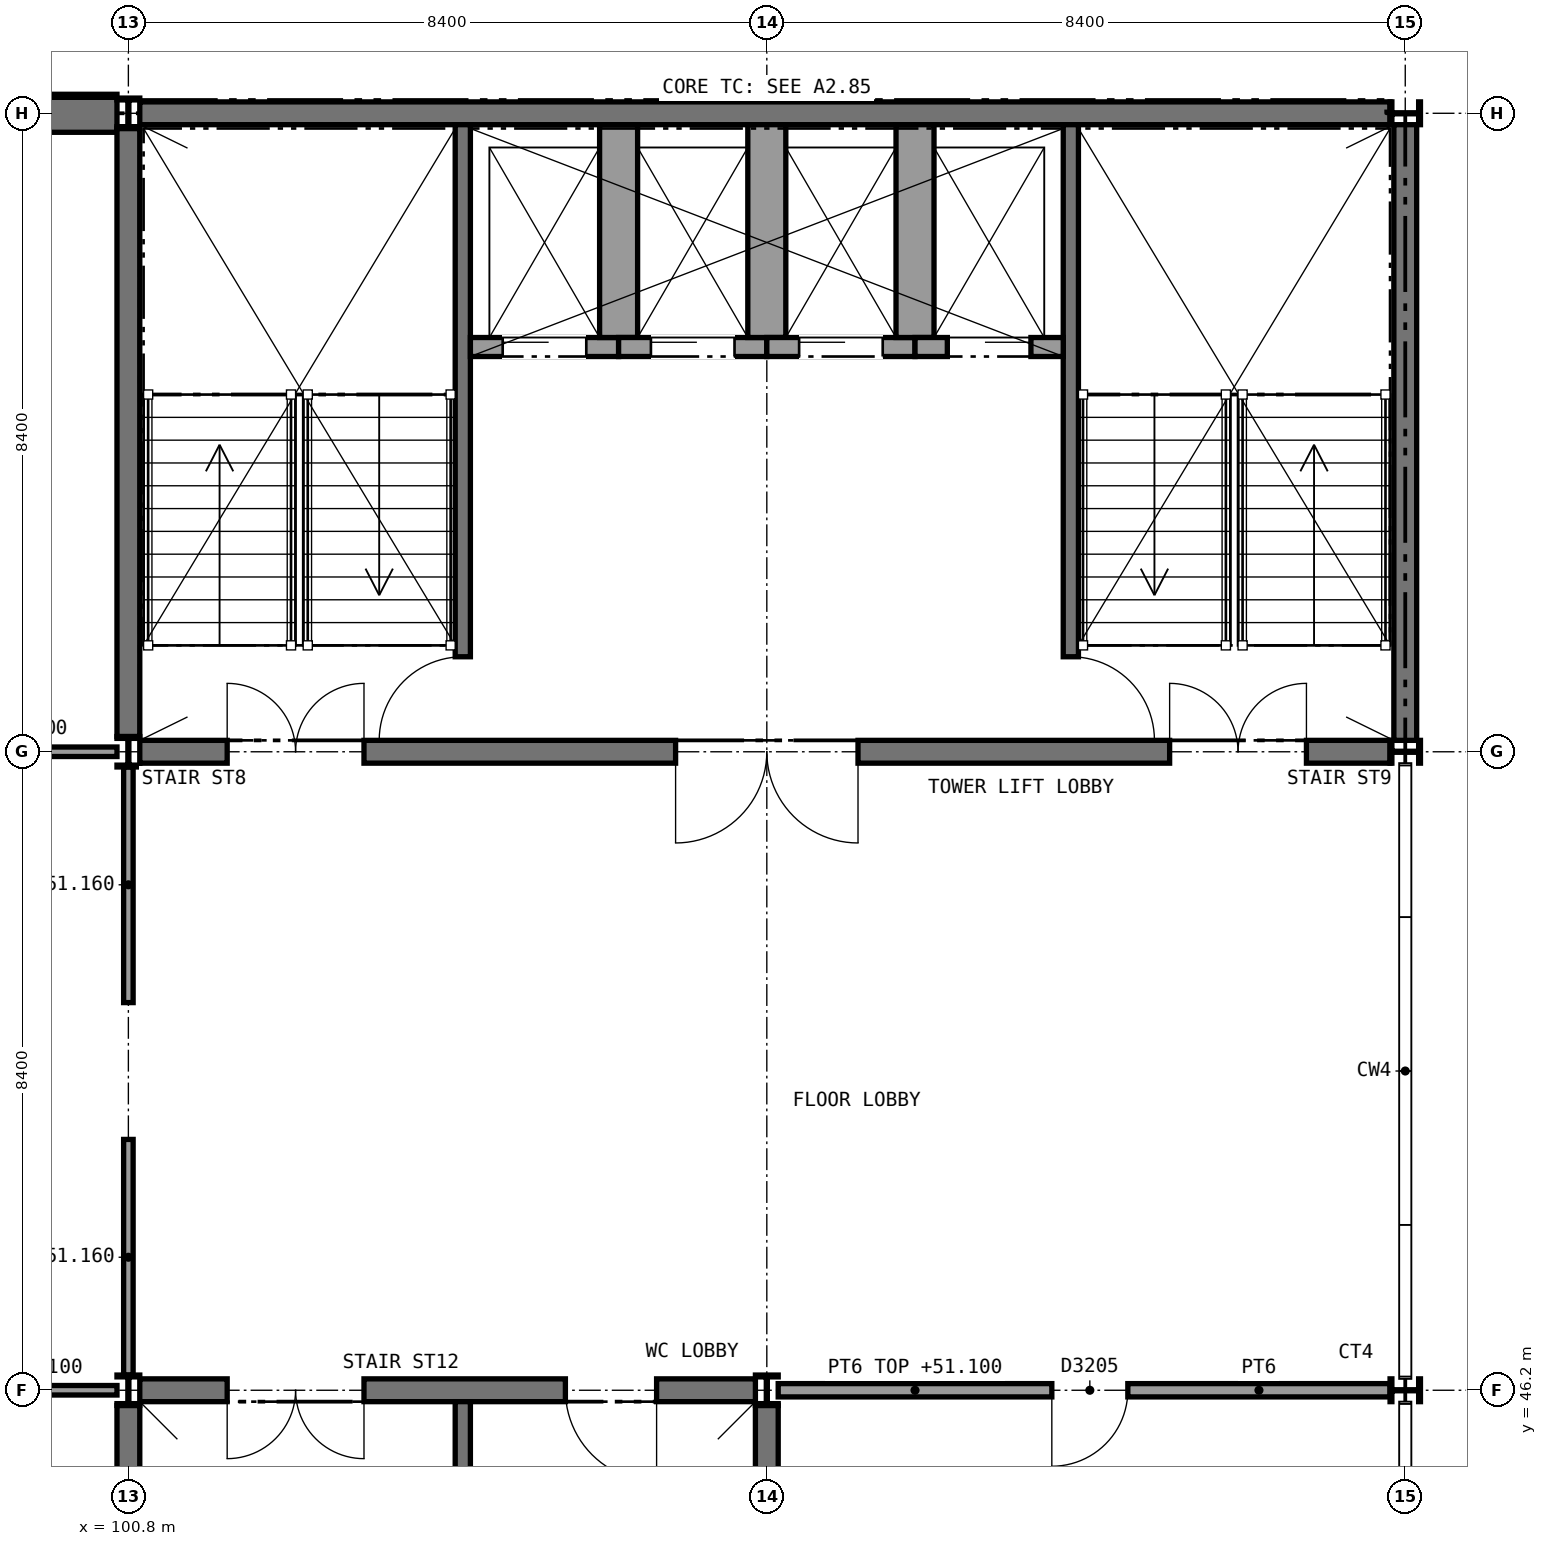
"""IFC4 building model, lengths in metres.
Left out: names, types, materials, properties, quantities, classifications, styles, units other than length and angle.
Written with IfcOpenShell. Run it as: python <this file> out.ifc"""

import sys

from ifc_helpers import new_model, si_unit, direction, frame, frame_2d, origin, origin_2d, place, context, subcontext, project, spatial, rectangle, i_section, extrude, element, fill, save


model = new_model("IFC4")
c1 = context("Model", 3, precision=1e-05, world=origin(), true_north=direction((0.0, 1.0)))
c2 = subcontext(c1, "Body", "Model", "MODEL_VIEW")
j1 = project(units=[si_unit("LENGTHUNIT", "METRE"), si_unit("PLANEANGLEUNIT", "RADIAN")], contexts=[c1])
p1 = place(None, origin())
s1 = spatial("IfcSite", under=j1, at=p1, CompositionType="ELEMENT")
p2 = place(p1, origin())
s2 = spatial("IfcBuilding", under=s1, at=p2, CompositionType="ELEMENT")
p3 = place(p2, frame((0.0, 0.0, 47.6)))
s3 = spatial("IfcBuildingStorey", under=s2, at=p3, CompositionType="ELEMENT", Elevation=47.6)
p4 = place(p3, frame((92.475, 63.0, 0.0), z_axis=(0.0, 0.0, 1.0), x_axis=(1.0, 0.0, 0.0)))
e1 = element("IfcWall", 1, at=p4, inside=s3, PredefinedType="SHEAR", context=c2, shape_type="SweptSolid", body=[
    extrude(rectangle(XDim=8.175, YDim=0.5, at=frame_2d((4.088, 0.0))), origin(), (0.0, 0.0, 1.0), 3.85),
])
p5 = place(p3, frame((100.95, 63.0, 0.0), z_axis=(0.0, 0.0, 1.0), x_axis=(1.0, 0.0, 0.0)))
e2 = element("IfcWall", 2, at=p5, inside=s3, PredefinedType="SHEAR", context=c2, shape_type="SweptSolid", body=[
    extrude(rectangle(XDim=16.45, YDim=0.3, at=frame_2d((8.225, 0.0))), origin(), (0.0, 0.0, 1.0), 3.85),
])
p6 = place(p3, frame((100.95, 54.6, 0.0), z_axis=(0.0, 0.0, 1.0), x_axis=(1.0, 0.0, 0.0)))
e3 = element("IfcWall", 3, at=p6, inside=s3, PredefinedType="SHEAR", context=c2, shape_type="SweptSolid", body=[
    extrude(rectangle(XDim=16.45, YDim=0.3, at=frame_2d((8.225, 0.0))), origin(), (0.0, 0.0, 1.0), 3.85),
])
p7 = place(p6, frame((1.15, 0.0, 0.0)))
e4 = element("IfcOpeningElement", 4, at=p7, cuts=e3, PredefinedType="OPENING", context=c2, shape_type="SweptSolid", body=[
    extrude(rectangle(XDim=1.8, YDim=2.1, at=frame_2d((0.9, 1.05))), frame((0.0, 0.16, 0.0), z_axis=(0.0, -1.0, 0.0), x_axis=(1.0, 0.0, 0.0)), (0.0, 0.0, 1.0), 0.32),
])
p8 = place(p6, frame((13.55, 0.0, 0.0)))
e5 = element("IfcOpeningElement", 5, at=p8, cuts=e3, PredefinedType="OPENING", context=c2, shape_type="SweptSolid", body=[
    extrude(rectangle(XDim=1.8, YDim=2.1, at=frame_2d((0.9, 1.05))), frame((0.0, 0.16, 0.0), z_axis=(0.0, -1.0, 0.0), x_axis=(1.0, 0.0, 0.0)), (0.0, 0.0, 1.0), 0.32),
])
p9 = place(p6, frame((7.05, 0.0, 0.0)))
e6 = element("IfcOpeningElement", 6, at=p9, cuts=e3, PredefinedType="OPENING", context=c2, shape_type="SweptSolid", body=[
    extrude(rectangle(XDim=2.4, YDim=2.4, at=frame_2d((1.2, 1.2))), frame((0.0, 0.16, 0.0), z_axis=(0.0, -1.0, 0.0), x_axis=(1.0, 0.0, 0.0)), (0.0, 0.0, 1.0), 0.32),
])
p10 = place(p3, frame((100.8, 54.8, 0.0), z_axis=(0.0, 0.0, 1.0), x_axis=(0.0, 1.0, 0.0)))
e7 = element("IfcWall", 7, at=p10, inside=s3, PredefinedType="SHEAR", context=c2, shape_type="SweptSolid", body=[
    extrude(rectangle(XDim=8.0, YDim=0.3, at=frame_2d((4.0, 0.0))), origin(), (0.0, 0.0, 1.0), 3.85),
])
p11 = place(p3, frame((117.6, 54.75, 0.0), z_axis=(0.0, 0.0, 1.0), x_axis=(0.0, 1.0, 0.0)))
e8 = element("IfcWall", 8, at=p11, inside=s3, PredefinedType="SHEAR", context=c2, shape_type="SweptSolid", body=[
    extrude(rectangle(XDim=8.1, YDim=0.3, at=frame_2d((4.05, 0.0))), origin(), (0.0, 0.0, 1.0), 3.85),
])
p12 = place(p3, frame((100.95, 46.2, 0.0), z_axis=(0.0, 0.0, 1.0), x_axis=(1.0, 0.0, 0.0)))
e9 = element("IfcWall", 9, at=p12, inside=s3, PredefinedType="SHEAR", context=c2, shape_type="SweptSolid", body=[
    extrude(rectangle(XDim=8.1, YDim=0.3, at=frame_2d((4.05, 0.0))), origin(), (0.0, 0.0, 1.0), 3.85),
])
p13 = place(p12, frame((1.15, 0.0, 0.0)))
e10 = element("IfcOpeningElement", 10, at=p13, cuts=e9, PredefinedType="OPENING", context=c2, shape_type="SweptSolid", body=[
    extrude(rectangle(XDim=1.8, YDim=2.1, at=frame_2d((0.9, 1.05))), frame((0.0, 0.16, 0.0), z_axis=(0.0, -1.0, 0.0), x_axis=(1.0, 0.0, 0.0)), (0.0, 0.0, 1.0), 0.32),
])
p14 = place(p12, frame((5.6, 0.0, 0.0)))
e11 = element("IfcOpeningElement", 11, at=p14, cuts=e9, PredefinedType="OPENING", context=c2, shape_type="SweptSolid", body=[
    extrude(rectangle(XDim=1.2, YDim=2.1, at=frame_2d((0.6, 1.05))), frame((0.0, 0.16, 0.0), z_axis=(0.0, -1.0, 0.0), x_axis=(1.0, 0.0, 0.0)), (0.0, 0.0, 1.0), 0.32),
])
for number, where, z_axis, x_axis in (
    (12, (100.8, 38.0, 0.0), (0.0, 0.0, 1.0), (0.0, 1.0, 0.0)),
    (13, (109.2, 38.0, 0.0), (0.0, 0.0, 1.0), (0.0, 1.0, 0.0)),
):
    element("IfcWall", number, at=place(p3, frame(where, z_axis=z_axis, x_axis=x_axis)), inside=s3, PredefinedType="SHEAR", context=c2, shape_type="SweptSolid", body=[
        extrude(rectangle(XDim=8.0, YDim=0.3, at=frame_2d((4.0, 0.0))), origin(), (0.0, 0.0, 1.0), 3.85),
    ])
for number, where, z_axis, x_axis in (
    (14, (100.8, 46.2, 0.0), (0.0, 0.0, 1.0), (1.0, 0.0, 0.0)),
    (15, (100.8, 54.6, 0.0), (0.0, 0.0, 1.0), (1.0, 0.0, 0.0)),
    (16, (100.8, 63.0, 0.0), (0.0, 0.0, 1.0), (1.0, 0.0, 0.0)),
    (17, (109.2, 46.2, 0.0), (0.0, 0.0, 1.0), (1.0, 0.0, 0.0)),
    (18, (117.6, 46.2, 0.0), (0.0, 0.0, 1.0), (0.0, 1.0, 0.0)),
    (19, (117.6, 54.6, 0.0), (0.0, 0.0, 1.0), (0.0, 1.0, 0.0)),
    (20, (117.6, 63.0, 0.0), (0.0, 0.0, 1.0), (0.0, 1.0, 0.0)),
):
    element("IfcColumn", number, at=place(p3, frame(where, z_axis=z_axis, x_axis=x_axis)), inside=s3, PredefinedType="COLUMN", context=c2, shape_type="SweptSolid", body=[
        extrude(i_section(OverallWidth=0.3, OverallDepth=0.4, WebThickness=0.013, FlangeThickness=0.024, FilletRadius=0.027, at=origin_2d()), origin(), (0.0, 0.0, 1.0), 4.0),
    ])
p15 = place(p3, frame((92.55, 46.2, 0.0), z_axis=(0.0, 0.0, 1.0), x_axis=(1.0, 0.0, 0.0)))
e21 = element("IfcWall", 21, at=p15, inside=s3, PredefinedType="PARTITIONING", context=c2, shape_type="SweptSolid", body=[
    extrude(rectangle(XDim=8.1, YDim=0.125, at=frame_2d((4.05, 0.0))), origin(), (0.0, 0.0, 1.0), 3.5),
])
p16 = place(p15, frame((3.1, 0.0, 0.0)))
e22 = element("IfcOpeningElement", 22, at=p16, cuts=e21, PredefinedType="OPENING", context=c2, shape_type="SweptSolid", body=[
    extrude(rectangle(XDim=1.8, YDim=2.1, at=frame_2d((0.9, 1.05))), frame((0.0, 0.073, 0.0), z_axis=(0.0, -1.0, 0.0), x_axis=(1.0, 0.0, 0.0)), (0.0, 0.0, 1.0), 0.145),
])
p17 = place(p3, frame((109.35, 46.2, 0.0), z_axis=(0.0, 0.0, 1.0), x_axis=(1.0, 0.0, 0.0)))
e23 = element("IfcWall", 23, at=p17, inside=s3, PredefinedType="PARTITIONING", context=c2, shape_type="SweptSolid", body=[
    extrude(rectangle(XDim=8.05, YDim=0.175, at=frame_2d((4.025, 0.0))), origin(), (0.0, 0.0, 1.0), 3.5),
])
p18 = place(p17, frame((3.6, 0.0, 0.0)))
e24 = element("IfcOpeningElement", 24, at=p18, cuts=e23, PredefinedType="OPENING", context=c2, shape_type="SweptSolid", body=[
    extrude(rectangle(XDim=1.0, YDim=2.1, at=frame_2d((0.5, 1.05))), frame((0.0, 0.098, 0.0), z_axis=(0.0, -1.0, 0.0), x_axis=(1.0, 0.0, 0.0)), (0.0, 0.0, 1.0), 0.195),
])
for number, where, z_axis, x_axis in (
    (25, (100.8, 46.4, 0.0), (0.0, 0.0, 1.0), (0.0, 1.0, 0.0)),
    (26, (100.8, 51.3, 0.0), (0.0, 0.0, 1.0), (0.0, 1.0, 0.0)),
):
    element("IfcWall", number, at=place(p3, frame(where, z_axis=z_axis, x_axis=x_axis)), inside=s3, PredefinedType="PARTITIONING", context=c2, shape_type="SweptSolid", body=[
        extrude(rectangle(XDim=3.1, YDim=0.125, at=frame_2d((1.55, 0.0))), origin(), (0.0, 0.0, 1.0), 3.56),
    ])
p19 = place(p3, frame((92.55, 54.6, 0.0), z_axis=(0.0, 0.0, 1.0), x_axis=(1.0, 0.0, 0.0)))
e27 = element("IfcWall", 27, at=p19, inside=s3, PredefinedType="PARTITIONING", context=c2, shape_type="SweptSolid", body=[
    extrude(rectangle(XDim=8.1, YDim=0.125, at=frame_2d((4.05, 0.0))), origin(), (0.0, 0.0, 1.0), 3.5),
])
p20 = place(p19, frame((3.6, 0.0, 0.0)))
e28 = element("IfcOpeningElement", 28, at=p20, cuts=e27, PredefinedType="OPENING", context=c2, shape_type="SweptSolid", body=[
    extrude(rectangle(XDim=0.9, YDim=2.1, at=frame_2d((0.45, 1.05))), frame((0.0, 0.073, 0.0), z_axis=(0.0, -1.0, 0.0), x_axis=(1.0, 0.0, 0.0)), (0.0, 0.0, 1.0), 0.145),
])
p21 = place(p3, frame((105.2, 62.85, 0.0), z_axis=(0.0, 0.0, 1.0), x_axis=(0.0, -1.0, 0.0)))
e29 = element("IfcWall", 29, at=p21, inside=s3, PredefinedType="SHEAR", context=c2, shape_type="SweptSolid", body=[
    extrude(rectangle(XDim=8.1, YDim=0.2, at=frame_2d((4.05, 0.0))), origin(), (0.0, 0.0, 1.0), 3.85),
])
p22 = place(p21, frame((7.0, 0.0, 0.0)))
e30 = element("IfcOpeningElement", 30, at=p22, cuts=e29, PredefinedType="OPENING", context=c2, shape_type="SweptSolid", body=[
    extrude(rectangle(XDim=1.11, YDim=2.1, at=frame_2d((0.555, 1.05))), frame((0.0, 0.11, 0.0), z_axis=(0.0, -1.0, 0.0), x_axis=(1.0, 0.0, 0.0)), (0.0, 0.0, 1.0), 0.22),
])
p23 = place(p3, frame((113.2, 62.85, 0.0), z_axis=(0.0, 0.0, 1.0), x_axis=(0.0, -1.0, 0.0)))
e31 = element("IfcWall", 31, at=p23, inside=s3, PredefinedType="SHEAR", context=c2, shape_type="SweptSolid", body=[
    extrude(rectangle(XDim=8.1, YDim=0.2, at=frame_2d((4.05, 0.0))), origin(), (0.0, 0.0, 1.0), 3.85),
])
p24 = place(p23, frame((7.0, 0.0, 0.0)))
e32 = element("IfcOpeningElement", 32, at=p24, cuts=e31, PredefinedType="OPENING", context=c2, shape_type="SweptSolid", body=[
    extrude(rectangle(XDim=1.11, YDim=2.1, at=frame_2d((0.555, 1.05))), frame((0.0, 0.11, 0.0), z_axis=(0.0, -1.0, 0.0), x_axis=(1.0, 0.0, 0.0)), (0.0, 0.0, 1.0), 0.22),
])
p25 = place(p3, frame((105.3, 59.925, 0.0), z_axis=(0.0, 0.0, 1.0), x_axis=(1.0, 0.0, 0.0)))
e33 = element("IfcWall", 33, at=p25, inside=s3, PredefinedType="SOLIDWALL", context=c2, shape_type="SweptSolid", body=[
    extrude(rectangle(XDim=1.95, YDim=0.25, at=frame_2d((0.975, 0.0))), origin(), (0.0, 0.0, 1.0), 4.0),
])
p26 = place(p25, frame((0.425, 0.0, 0.0)))
e34 = element("IfcOpeningElement", 34, at=p26, cuts=e33, PredefinedType="OPENING", context=c2, shape_type="SweptSolid", body=[
    extrude(rectangle(XDim=1.1, YDim=2.1, at=frame_2d((0.55, 1.05))), frame((0.0, 0.135, 0.0), z_axis=(0.0, -1.0, 0.0), x_axis=(1.0, 0.0, 0.0)), (0.0, 0.0, 1.0), 0.27),
])
p27 = place(p3, frame((107.25, 62.85, 0.0), z_axis=(0.0, 0.0, 1.0), x_axis=(0.0, -1.0, 0.0)))
e35 = element("IfcWall", 35, at=p27, inside=s3, PredefinedType="SOLIDWALL", context=c2, shape_type="SweptSolid", body=[
    extrude(rectangle(XDim=2.8, YDim=0.5, at=frame_2d((1.4, 0.0))), origin(), (0.0, 0.0, 1.0), 4.0),
])
p28 = place(p3, frame((107.25, 59.925, 0.0), z_axis=(0.0, 0.0, 1.0), x_axis=(1.0, 0.0, 0.0)))
e36 = element("IfcWall", 36, at=p28, inside=s3, PredefinedType="SOLIDWALL", context=c2, shape_type="SweptSolid", body=[
    extrude(rectangle(XDim=1.95, YDim=0.25, at=frame_2d((0.975, 0.0))), origin(), (0.0, 0.0, 1.0), 4.0),
])
p29 = place(p28, frame((0.425, 0.0, 0.0)))
e37 = element("IfcOpeningElement", 37, at=p29, cuts=e36, PredefinedType="OPENING", context=c2, shape_type="SweptSolid", body=[
    extrude(rectangle(XDim=1.1, YDim=2.1, at=frame_2d((0.55, 1.05))), frame((0.0, 0.135, 0.0), z_axis=(0.0, -1.0, 0.0), x_axis=(1.0, 0.0, 0.0)), (0.0, 0.0, 1.0), 0.27),
])
p30 = place(p3, frame((109.2, 62.85, 0.0), z_axis=(0.0, 0.0, 1.0), x_axis=(0.0, -1.0, 0.0)))
e38 = element("IfcWall", 38, at=p30, inside=s3, PredefinedType="SOLIDWALL", context=c2, shape_type="SweptSolid", body=[
    extrude(rectangle(XDim=2.8, YDim=0.5, at=frame_2d((1.4, 0.0))), origin(), (0.0, 0.0, 1.0), 4.0),
])
p31 = place(p3, frame((109.2, 59.925, 0.0), z_axis=(0.0, 0.0, 1.0), x_axis=(1.0, 0.0, 0.0)))
e39 = element("IfcWall", 39, at=p31, inside=s3, PredefinedType="SOLIDWALL", context=c2, shape_type="SweptSolid", body=[
    extrude(rectangle(XDim=1.95, YDim=0.25, at=frame_2d((0.975, 0.0))), origin(), (0.0, 0.0, 1.0), 4.0),
])
p32 = place(p31, frame((0.425, 0.0, 0.0)))
e40 = element("IfcOpeningElement", 40, at=p32, cuts=e39, PredefinedType="OPENING", context=c2, shape_type="SweptSolid", body=[
    extrude(rectangle(XDim=1.1, YDim=2.1, at=frame_2d((0.55, 1.05))), frame((0.0, 0.135, 0.0), z_axis=(0.0, -1.0, 0.0), x_axis=(1.0, 0.0, 0.0)), (0.0, 0.0, 1.0), 0.27),
])
p33 = place(p3, frame((111.15, 62.85, 0.0), z_axis=(0.0, 0.0, 1.0), x_axis=(0.0, -1.0, 0.0)))
e41 = element("IfcWall", 41, at=p33, inside=s3, PredefinedType="SOLIDWALL", context=c2, shape_type="SweptSolid", body=[
    extrude(rectangle(XDim=2.8, YDim=0.5, at=frame_2d((1.4, 0.0))), origin(), (0.0, 0.0, 1.0), 4.0),
])
p34 = place(p3, frame((111.15, 59.925, 0.0), z_axis=(0.0, 0.0, 1.0), x_axis=(1.0, 0.0, 0.0)))
e42 = element("IfcWall", 42, at=p34, inside=s3, PredefinedType="SOLIDWALL", context=c2, shape_type="SweptSolid", body=[
    extrude(rectangle(XDim=1.95, YDim=0.25, at=frame_2d((0.975, 0.0))), origin(), (0.0, 0.0, 1.0), 4.0),
])
p35 = place(p34, frame((0.425, 0.0, 0.0)))
e43 = element("IfcOpeningElement", 43, at=p35, cuts=e42, PredefinedType="OPENING", context=c2, shape_type="SweptSolid", body=[
    extrude(rectangle(XDim=1.1, YDim=2.1, at=frame_2d((0.55, 1.05))), frame((0.0, 0.135, 0.0), z_axis=(0.0, -1.0, 0.0), x_axis=(1.0, 0.0, 0.0)), (0.0, 0.0, 1.0), 0.27),
])
p36 = place(p3, frame((105.2, 37.95, 0.0), z_axis=(0.0, 0.0, 1.0), x_axis=(0.0, 1.0, 0.0)))
e44 = element("IfcWall", 44, at=p36, inside=s3, PredefinedType="SHEAR", context=c2, shape_type="SweptSolid", body=[
    extrude(rectangle(XDim=8.1, YDim=0.2, at=frame_2d((4.05, 0.0))), origin(), (0.0, 0.0, 1.0), 3.85),
])
p37 = place(p18, frame((1.0, 0.0, 0.0), z_axis=(0.0, 0.0, 1.0), x_axis=(-1.0, 0.0, 0.0)))
e45 = element("IfcDoor", 45, at=p37, inside=s3, OperationType="SINGLE_SWING_RIGHT", PredefinedType="DOOR", context=c2, shape_type="SweptSolid", body=[
    extrude(rectangle(XDim=1.0, YDim=2.1, at=frame_2d((0.5, 1.05))), frame((0.0, 0.025, 0.0), z_axis=(0.0, -1.0, 0.0), x_axis=(1.0, 0.0, 0.0)), (0.0, 0.0, 1.0), 0.05),
])
fill(e24, e45)
p38 = place(p22, frame((1.1, 0.0, 0.0), z_axis=(0.0, 0.0, 1.0), x_axis=(-1.0, 0.0, 0.0)))
e46 = element("IfcDoor", 46, at=p38, inside=s3, OperationType="SINGLE_SWING_LEFT", PredefinedType="DOOR", context=c2, shape_type="SweptSolid", body=[
    extrude(rectangle(XDim=1.1, YDim=2.1, at=frame_2d((0.55, 1.05))), frame((0.0, 0.025, 0.0), z_axis=(0.0, -1.0, 0.0), x_axis=(1.0, 0.0, 0.0)), (0.0, 0.0, 1.0), 0.05),
])
fill(e30, e46)
p39 = place(p24, origin())
e47 = element("IfcDoor", 47, at=p39, inside=s3, OperationType="SINGLE_SWING_RIGHT", PredefinedType="DOOR", context=c2, shape_type="SweptSolid", body=[
    extrude(rectangle(XDim=1.1, YDim=2.1, at=frame_2d((0.55, 1.05))), frame((0.0, 0.025, 0.0), z_axis=(0.0, -1.0, 0.0), x_axis=(1.0, 0.0, 0.0)), (0.0, 0.0, 1.0), 0.05),
])
fill(e32, e47)
p40 = place(p26, frame((1.1, 0.0, 0.0), z_axis=(0.0, 0.0, 1.0), x_axis=(-1.0, 0.0, 0.0)))
e48 = element("IfcDoor", 48, at=p40, inside=s3, OperationType="SLIDING_TO_RIGHT", PredefinedType="DOOR", context=c2, shape_type="SweptSolid", body=[
    extrude(rectangle(XDim=1.1, YDim=2.1, at=frame_2d((0.55, 1.05))), frame((0.0, 0.025, 0.0), z_axis=(0.0, -1.0, 0.0), x_axis=(1.0, 0.0, 0.0)), (0.0, 0.0, 1.0), 0.05),
])
fill(e34, e48)
p41 = place(p29, frame((1.1, 0.0, 0.0), z_axis=(0.0, 0.0, 1.0), x_axis=(-1.0, 0.0, 0.0)))
e49 = element("IfcDoor", 49, at=p41, inside=s3, OperationType="SLIDING_TO_RIGHT", PredefinedType="DOOR", context=c2, shape_type="SweptSolid", body=[
    extrude(rectangle(XDim=1.1, YDim=2.1, at=frame_2d((0.55, 1.05))), frame((0.0, 0.025, 0.0), z_axis=(0.0, -1.0, 0.0), x_axis=(1.0, 0.0, 0.0)), (0.0, 0.0, 1.0), 0.05),
])
fill(e37, e49)
p42 = place(p32, frame((1.1, 0.0, 0.0), z_axis=(0.0, 0.0, 1.0), x_axis=(-1.0, 0.0, 0.0)))
e50 = element("IfcDoor", 50, at=p42, inside=s3, OperationType="SLIDING_TO_RIGHT", PredefinedType="DOOR", context=c2, shape_type="SweptSolid", body=[
    extrude(rectangle(XDim=1.1, YDim=2.1, at=frame_2d((0.55, 1.05))), frame((0.0, 0.025, 0.0), z_axis=(0.0, -1.0, 0.0), x_axis=(1.0, 0.0, 0.0)), (0.0, 0.0, 1.0), 0.05),
])
fill(e40, e50)
p43 = place(p35, frame((1.1, 0.0, 0.0), z_axis=(0.0, 0.0, 1.0), x_axis=(-1.0, 0.0, 0.0)))
e51 = element("IfcDoor", 51, at=p43, inside=s3, OperationType="SLIDING_TO_LEFT", PredefinedType="DOOR", context=c2, shape_type="SweptSolid", body=[
    extrude(rectangle(XDim=1.1, YDim=2.1, at=frame_2d((0.55, 1.05))), frame((0.0, 0.025, 0.0), z_axis=(0.0, -1.0, 0.0), x_axis=(1.0, 0.0, 0.0)), (0.0, 0.0, 1.0), 0.05),
])
fill(e43, e51)
p44 = place(p7, origin())
e52 = element("IfcDoor", 52, at=p44, inside=s3, OperationType="DOUBLE_DOOR_SINGLE_SWING", PredefinedType="DOOR", context=c2, shape_type="SweptSolid", body=[
    extrude(rectangle(XDim=1.8, YDim=2.1, at=frame_2d((0.9, 1.05))), frame((0.0, 0.025, 0.0), z_axis=(0.0, -1.0, 0.0), x_axis=(1.0, 0.0, 0.0)), (0.0, 0.0, 1.0), 0.05),
])
fill(e4, e52)
p45 = place(p8, origin())
e53 = element("IfcDoor", 53, at=p45, inside=s3, OperationType="DOUBLE_DOOR_SINGLE_SWING", PredefinedType="DOOR", context=c2, shape_type="SweptSolid", body=[
    extrude(rectangle(XDim=1.8, YDim=2.1, at=frame_2d((0.9, 1.05))), frame((0.0, 0.025, 0.0), z_axis=(0.0, -1.0, 0.0), x_axis=(1.0, 0.0, 0.0)), (0.0, 0.0, 1.0), 0.05),
])
fill(e5, e53)
p46 = place(p9, frame((2.4, 0.0, 0.0), z_axis=(0.0, 0.0, 1.0), x_axis=(-1.0, 0.0, 0.0)))
e54 = element("IfcDoor", 54, at=p46, inside=s3, OperationType="DOUBLE_DOOR_SINGLE_SWING", PredefinedType="DOOR", context=c2, shape_type="SweptSolid", body=[
    extrude(rectangle(XDim=2.4, YDim=2.4, at=frame_2d((1.2, 1.2))), frame((0.0, 0.025, 0.0), z_axis=(0.0, -1.0, 0.0), x_axis=(1.0, 0.0, 0.0)), (0.0, 0.0, 1.0), 0.05),
])
fill(e6, e54)
p47 = place(p13, frame((1.8, 0.0, 0.0), z_axis=(0.0, 0.0, 1.0), x_axis=(-1.0, 0.0, 0.0)))
e55 = element("IfcDoor", 55, at=p47, inside=s3, OperationType="DOUBLE_DOOR_SINGLE_SWING", PredefinedType="DOOR", context=c2, shape_type="SweptSolid", body=[
    extrude(rectangle(XDim=1.8, YDim=2.1, at=frame_2d((0.9, 1.05))), frame((0.0, 0.025, 0.0), z_axis=(0.0, -1.0, 0.0), x_axis=(1.0, 0.0, 0.0)), (0.0, 0.0, 1.0), 0.05),
])
fill(e10, e55)
p48 = place(p14, frame((1.2, 0.0, 0.0), z_axis=(0.0, 0.0, 1.0), x_axis=(-1.0, 0.0, 0.0)))
e56 = element("IfcDoor", 56, at=p48, inside=s3, OperationType="SINGLE_SWING_LEFT", PredefinedType="DOOR", context=c2, shape_type="SweptSolid", body=[
    extrude(rectangle(XDim=1.2, YDim=2.1, at=frame_2d((0.6, 1.05))), frame((0.0, 0.025, 0.0), z_axis=(0.0, -1.0, 0.0), x_axis=(1.0, 0.0, 0.0)), (0.0, 0.0, 1.0), 0.05),
])
fill(e11, e56)
save(model, sys.argv[1])
